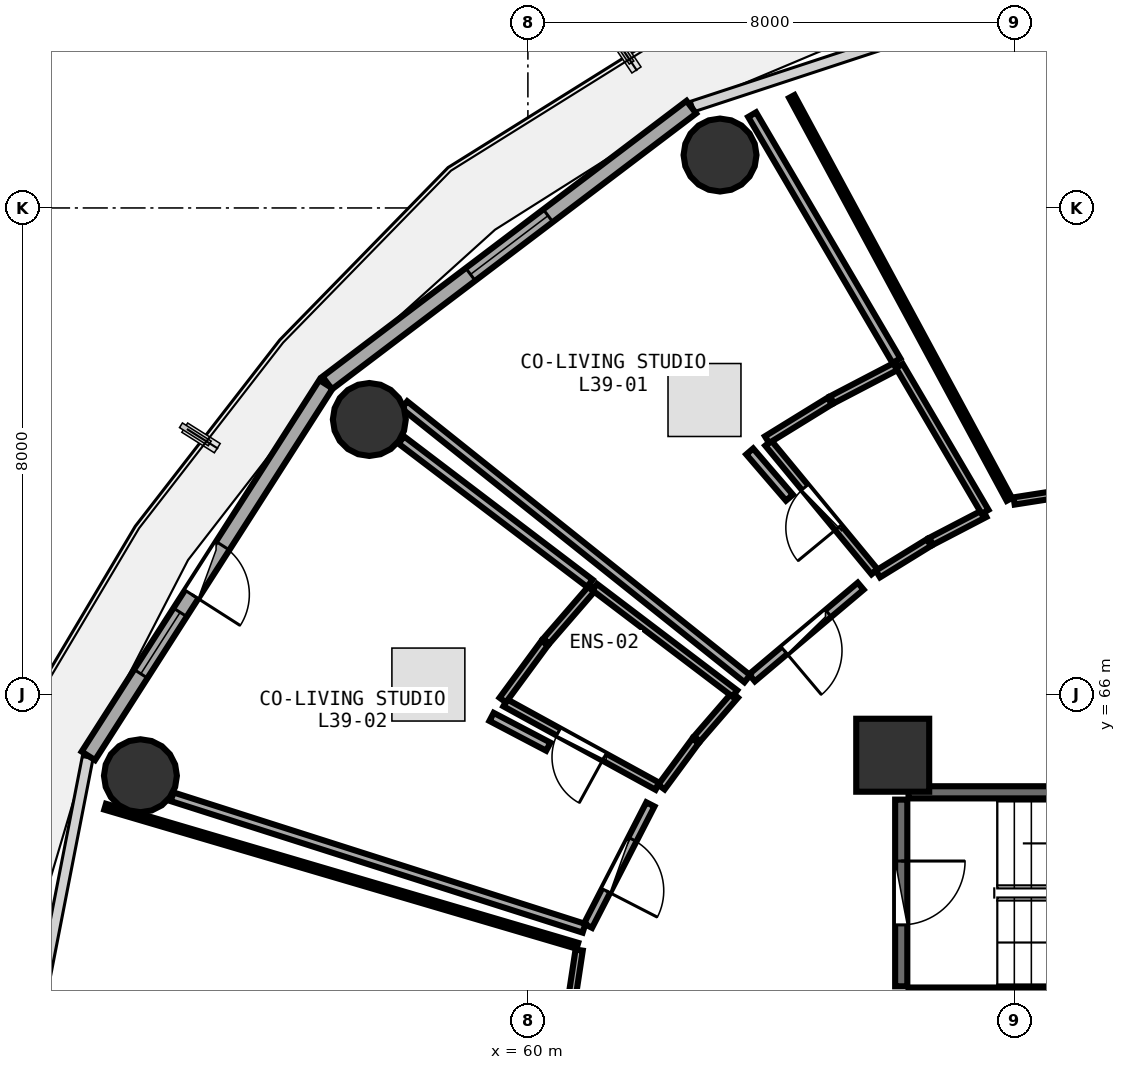
"""IFC4 building model, lengths in metres.
Left out: names, types, materials, properties, quantities, classifications, styles, units other than length and angle.
Written with IfcOpenShell. Run it as: python <this file> out.ifc"""

import sys

from ifc_helpers import new_model, si_unit, direction, frame, frame_2d, origin, origin_2d, place, context, subcontext, project, spatial, rectangle, circle, extrude, element, fill, save


model = new_model("IFC4")
c1 = context("Model", 3, precision=1e-05, world=origin(), true_north=direction((0.0, 1.0)))
c2 = subcontext(c1, "Body", "Model", "MODEL_VIEW")
j1 = project(units=[si_unit("LENGTHUNIT", "METRE"), si_unit("PLANEANGLEUNIT", "RADIAN")], contexts=[c1])
p1 = place(None, origin())
s1 = spatial("IfcSite", under=j1, at=p1, CompositionType="ELEMENT")
p2 = place(p1, origin())
s2 = spatial("IfcBuilding", under=s1, at=p2, CompositionType="ELEMENT")
p3 = place(p2, frame((0.0, 0.0, 154.35)))
s3 = spatial("IfcBuildingStorey", under=s2, at=p3, CompositionType="ELEMENT", Elevation=154.35)
p4 = place(p3, frame((66.0, 65.0, 0.0), z_axis=(0.0, 0.0, 1.0), x_axis=(1.0, 0.0, 0.0)))
e1 = element("IfcColumn", 1, at=p4, inside=s3, PredefinedType="PILASTER", context=c2, shape_type="SweptSolid", body=[
    extrude(rectangle(XDim=1.2, YDim=1.2, at=origin_2d()), origin(), (0.0, 0.0, 1.0), 3.75),
])
for number, where, z_axis, x_axis in (
    (2, (63.16, 74.87, 0.0), (0.0, 0.0, 1.0), (1.0, 0.0, 0.0)),
    (3, (57.392, 70.521, 0.0), (0.0, 0.0, 1.0), (1.0, 0.0, 0.0)),
    (4, (53.627, 64.663, 0.0), (0.0, 0.0, 1.0), (1.0, 0.0, 0.0)),
):
    element("IfcColumn", number, at=place(p3, frame(where, z_axis=z_axis, x_axis=x_axis)), inside=s3, PredefinedType="COLUMN", context=c2, shape_type="SweptSolid", body=[
        extrude(circle(Radius=0.6, at=origin_2d()), origin(), (0.0, 0.0, 1.0), 3.75),
    ])
p5 = place(p3, frame((62.688, 75.658, 0.0), z_axis=(0.0, 0.0, 1.0), x_axis=(-0.797163719609, -0.603763202042, 0.0)))
e5 = element("IfcWall", 5, at=p5, inside=s3, PredefinedType="SOLIDWALL", context=c2, shape_type="SweptSolid", body=[
    extrude(rectangle(XDim=7.512, YDim=0.26, at=frame_2d((3.756, 0.0))), origin(), (0.0, 0.0, 1.0), 3.475),
])
p6 = place(p5, frame((2.956, 0.0, 0.85)))
e6 = element("IfcOpeningElement", 6, at=p6, cuts=e5, PredefinedType="OPENING", context=c2, shape_type="SweptSolid", body=[
    extrude(rectangle(XDim=1.6, YDim=1.45, at=frame_2d((0.8, 0.725))), frame((0.0, 0.14, 0.0), z_axis=(0.0, -1.0, 0.0), x_axis=(1.0, 0.0, 0.0)), (0.0, 0.0, 1.0), 0.28),
])
p7 = place(p3, frame((56.679, 71.1, 0.0), z_axis=(0.0, 0.0, 1.0), x_axis=(-0.538801521808, -0.842432739213, 0.0)))
e7 = element("IfcWall", 7, at=p7, inside=s3, PredefinedType="SOLIDWALL", context=c2, shape_type="SweptSolid", body=[
    extrude(rectangle(XDim=7.253, YDim=0.26, at=frame_2d((3.627, 0.0))), origin(), (0.0, 0.0, 1.0), 3.475),
])
p8 = place(p7, frame((3.152, 0.0, 0.0)))
e8 = element("IfcOpeningElement", 8, at=p8, cuts=e7, PredefinedType="OPENING", context=c2, shape_type="SweptSolid", body=[
    extrude(rectangle(XDim=0.95, YDim=2.1, at=frame_2d((0.475, 1.05))), frame((0.0, 0.14, 0.0), z_axis=(0.0, -1.0, 0.0), x_axis=(1.0, 0.0, 0.0)), (0.0, 0.0, 1.0), 0.28),
])
p9 = place(p7, frame((4.452, 0.0, 0.85)))
e9 = element("IfcOpeningElement", 9, at=p9, cuts=e7, PredefinedType="OPENING", context=c2, shape_type="SweptSolid", body=[
    extrude(rectangle(XDim=1.2, YDim=1.45, at=frame_2d((0.6, 0.725))), frame((0.0, 0.14, 0.0), z_axis=(0.0, -1.0, 0.0), x_axis=(1.0, 0.0, 0.0)), (0.0, 0.0, 1.0), 0.28),
])
for number, where, z_axis, x_axis in (
    (10, (66.26, 61.08, 0.0), (0.0, 0.0, 1.0), (1.0, 0.0, 0.0)),
    (11, (73.42, 64.39, 0.0), (0.0, 0.0, 1.0), (-1.0, 0.0, 0.0)),
):
    element("IfcWall", number, at=place(p3, frame(where, z_axis=z_axis, x_axis=x_axis)), inside=s3, PredefinedType="SHEAR", context=c2, shape_type="SweptSolid", body=[
        extrude(rectangle(XDim=7.16, YDim=0.2, at=frame_2d((3.58, 0.0))), origin(), (0.0, 0.0, 1.0), 3.49),
    ])
p10 = place(p3, frame((66.14, 64.27, 0.0), z_axis=(0.0, 0.0, 1.0), x_axis=(0.0, -1.0, 0.0)))
e12 = element("IfcWall", 12, at=p10, inside=s3, PredefinedType="SHEAR", context=c2, shape_type="SweptSolid", body=[
    extrude(rectangle(XDim=3.07, YDim=0.2, at=frame_2d((1.535, 0.0))), origin(), (0.0, 0.0, 1.0), 3.49),
])
p11 = place(p10, frame((1.01, 0.0, 0.0)))
e13 = element("IfcOpeningElement", 13, at=p11, cuts=e12, PredefinedType="OPENING", context=c2, shape_type="SweptSolid", body=[
    extrude(rectangle(XDim=1.05, YDim=2.1, at=frame_2d((0.525, 1.05))), frame((0.0, 0.11, 0.0), z_axis=(0.0, -1.0, 0.0), x_axis=(1.0, 0.0, 0.0)), (0.0, 0.0, 1.0), 0.22),
])
p12 = place(p3, frame((75.447, 70.347, 0.0), z_axis=(0.0, 0.0, 1.0), x_axis=(-0.987988721118, -0.154526007337, 0.0)))
e14 = element("IfcWall", 14, at=p12, inside=s3, PredefinedType="PARTITIONING", context=c2, shape_type="SweptSolid", body=[
    extrude(rectangle(XDim=7.541, YDim=0.12, at=frame_2d((3.771, 0.0))), origin(), (0.0, 0.0, 1.0), 2.975),
])
p13 = place(p12, frame((3.32, 0.0, 0.0)))
e15 = element("IfcOpeningElement", 15, at=p13, cuts=e14, PredefinedType="OPENING", context=c2, shape_type="SweptSolid", body=[
    extrude(rectangle(XDim=0.9, YDim=2.08, at=frame_2d((0.45, 1.04))), frame((0.0, 0.07, 0.0), z_axis=(0.0, -1.0, 0.0), x_axis=(1.0, 0.0, 0.0)), (0.0, 0.0, 1.0), 0.14),
])
p14 = place(p3, frame((65.702, 68.016, 0.0), z_axis=(0.0, 0.0, 1.0), x_axis=(-0.636757315483, 0.771064278241, 0.0)))
e16 = element("IfcWall", 16, at=p14, inside=s3, PredefinedType="PLUMBINGWALL", context=c2, shape_type="SweptSolid", body=[
    extrude(rectangle(XDim=2.745, YDim=0.13, at=frame_2d((1.373, 0.0))), origin(), (0.0, 0.0, 1.0), 2.975),
])
p15 = place(p14, frame((0.942, 0.0, 0.0)))
e17 = element("IfcOpeningElement", 17, at=p15, cuts=e16, PredefinedType="OPENING", context=c2, shape_type="SweptSolid", body=[
    extrude(rectangle(XDim=0.86, YDim=2.05, at=frame_2d((0.43, 1.025))), frame((0.0, 0.075, 0.0), z_axis=(0.0, -1.0, 0.0), x_axis=(1.0, 0.0, 0.0)), (0.0, 0.0, 1.0), 0.15),
])
p16 = place(p3, frame((65.473, 67.78, 0.0), z_axis=(0.0, 0.0, 1.0), x_axis=(-0.764572750514, -0.644537438146, 0.0)))
e18 = element("IfcWall", 18, at=p16, inside=s3, PredefinedType="PARTITIONING", context=c2, shape_type="SweptSolid", body=[
    extrude(rectangle(XDim=2.339, YDim=0.15, at=frame_2d((1.169, 0.0))), origin(), (0.0, 0.0, 1.0), 2.975),
])
p17 = place(p16, frame((0.694, 0.0, 0.0)))
e19 = element("IfcOpeningElement", 19, at=p17, cuts=e18, PredefinedType="OPENING", context=c2, shape_type="SweptSolid", body=[
    extrude(rectangle(XDim=0.95, YDim=2.08, at=frame_2d((0.475, 1.04))), frame((0.0, 0.085, 0.0), z_axis=(0.0, -1.0, 0.0), x_axis=(1.0, 0.0, 0.0)), (0.0, 0.0, 1.0), 0.17),
])
p18 = place(p3, frame((62.131, 64.489, 0.0), z_axis=(0.0, 0.0, 1.0), x_axis=(-0.87680194327, 0.480851694681, 0.0)))
e20 = element("IfcWall", 20, at=p18, inside=s3, PredefinedType="PLUMBINGWALL", context=c2, shape_type="SweptSolid", body=[
    extrude(rectangle(XDim=2.855, YDim=0.13, at=frame_2d((1.428, 0.0))), origin(), (0.0, 0.0, 1.0), 2.975),
])
p19 = place(p18, frame((0.998, 0.0, 0.0)))
e21 = element("IfcOpeningElement", 21, at=p19, cuts=e20, PredefinedType="OPENING", context=c2, shape_type="SweptSolid", body=[
    extrude(rectangle(XDim=0.86, YDim=2.05, at=frame_2d((0.43, 1.025))), frame((0.0, 0.075, 0.0), z_axis=(0.0, -1.0, 0.0), x_axis=(1.0, 0.0, 0.0)), (0.0, 0.0, 1.0), 0.15),
])
p20 = place(p3, frame((62.015, 64.192, 0.0), z_axis=(0.0, 0.0, 1.0), x_axis=(-0.457234963971, -0.889345932538, 0.0)))
e22 = element("IfcWall", 22, at=p20, inside=s3, PredefinedType="PARTITIONING", context=c2, shape_type="SweptSolid", body=[
    extrude(rectangle(XDim=2.245, YDim=0.15, at=frame_2d((1.122, 0.0))), origin(), (0.0, 0.0, 1.0), 3.235),
])
p21 = place(p20, frame((0.647, 0.0, 0.0)))
e23 = element("IfcOpeningElement", 23, at=p21, cuts=e22, PredefinedType="OPENING", context=c2, shape_type="SweptSolid", body=[
    extrude(rectangle(XDim=0.95, YDim=2.08, at=frame_2d((0.475, 1.04))), frame((0.0, 0.085, 0.0), z_axis=(0.0, -1.0, 0.0), x_axis=(1.0, 0.0, 0.0)), (0.0, 0.0, 1.0), 0.17),
])
p22 = place(p3, frame((60.843, 61.796, 0.0), z_axis=(0.0, 0.0, 1.0), x_axis=(-0.149807046494, -0.988715251638, 0.0)))
e24 = element("IfcWall", 24, at=p22, inside=s3, PredefinedType="PARTITIONING", context=c2, shape_type="SweptSolid", body=[
    extrude(rectangle(XDim=4.338, YDim=0.12, at=frame_2d((2.169, 0.0))), origin(), (0.0, 0.0, 1.0), 2.975),
])
p23 = place(p22, frame((1.719, 0.0, 0.0)))
e25 = element("IfcOpeningElement", 25, at=p23, cuts=e24, PredefinedType="OPENING", context=c2, shape_type="SweptSolid", body=[
    extrude(rectangle(XDim=0.9, YDim=2.08, at=frame_2d((0.45, 1.04))), frame((0.0, 0.07, 0.0), z_axis=(0.0, -1.0, 0.0), x_axis=(1.0, 0.0, 0.0)), (0.0, 0.0, 1.0), 0.14),
])
p24 = place(p3, frame((67.918, 69.207, 0.0), z_axis=(0.0, 0.0, 1.0), x_axis=(-0.475160964166, 0.879898890858, 0.0)))
e26 = element("IfcWall", 26, at=p24, inside=s3, PredefinedType="PARTITIONING", context=c2, shape_type="SweptSolid", body=[
    extrude(rectangle(XDim=7.53, YDim=0.1, at=frame_2d((3.765, 0.0))), origin(), (0.0, 0.0, 1.0), 3.025),
])
p25 = place(p3, frame((67.511, 68.976, 0.0), z_axis=(0.0, 0.0, 1.0), x_axis=(-0.88687840459, -0.462002917168, 0.0)))
e27 = element("IfcWall", 27, at=p25, inside=s3, PredefinedType="PLUMBINGWALL", context=c2, shape_type="SweptSolid", body=[
    extrude(rectangle(XDim=0.993, YDim=0.13, at=frame_2d((0.497, 0.0))), origin(), (0.0, 0.0, 1.0), 3.235),
])
p26 = place(p3, frame((66.596, 68.498, 0.0), z_axis=(0.0, 0.0, 1.0), x_axis=(-0.851266784219, -0.52473313416, 0.0)))
e28 = element("IfcWall", 28, at=p26, inside=s3, PredefinedType="PLUMBINGWALL", context=c2, shape_type="SweptSolid", body=[
    extrude(rectangle(XDim=0.985, YDim=0.13, at=frame_2d((0.493, 0.0))), origin(), (0.0, 0.0, 1.0), 3.48),
])
p27 = place(p3, frame((63.933, 70.189, 0.0), z_axis=(0.0, 0.0, 1.0), x_axis=(0.851319302067, 0.524647925688, 0.0)))
e29 = element("IfcWall", 29, at=p27, inside=s3, PredefinedType="PLUMBINGWALL", context=c2, shape_type="SweptSolid", body=[
    extrude(rectangle(XDim=1.212, YDim=0.13, at=frame_2d((0.606, 0.0))), origin(), (0.0, 0.0, 1.0), 2.975),
])
p28 = place(p3, frame((65.0, 70.845, 0.0), z_axis=(0.0, 0.0, 1.0), x_axis=(0.886527747476, 0.462675429383, 0.0)))
e30 = element("IfcWall", 30, at=p28, inside=s3, PredefinedType="PLUMBINGWALL", context=c2, shape_type="SweptSolid", body=[
    extrude(rectangle(XDim=1.22, YDim=0.13, at=frame_2d((0.61, 0.0))), origin(), (0.0, 0.0, 1.0), 3.175),
])
p29 = place(p3, frame((66.109, 71.402, 0.0), z_axis=(0.0, 0.0, 1.0), x_axis=(0.506513995599, -0.862231739304, 0.0)))
e31 = element("IfcWall", 31, at=p29, inside=s3, PredefinedType="PLUMBINGWALL", context=c2, shape_type="SweptSolid", body=[
    extrude(rectangle(XDim=2.783, YDim=0.13, at=frame_2d((1.392, 0.0))), origin(), (0.0, 0.0, 1.0), 3.175),
])
p30 = place(p3, frame((63.608, 66.259, 0.0), z_axis=(0.0, 0.0, 1.0), x_axis=(-0.781429667655, 0.623993328898, 0.0)))
e32 = element("IfcWall", 32, at=p30, inside=s3, PredefinedType="PARTITIONING", context=c2, shape_type="SweptSolid", body=[
    extrude(rectangle(XDim=7.216, YDim=0.15, at=frame_2d((3.608, 0.0))), origin(), (0.0, 0.0, 1.0), 2.975),
])
p31 = place(p3, frame((63.688, 75.534, 0.0), z_axis=(0.0, 0.0, 1.0), x_axis=(0.505850409321, -0.862621216636, 0.0)))
e33 = element("IfcWall", 33, at=p31, inside=s3, PredefinedType="PARTITIONING", context=c2, shape_type="SweptSolid", body=[
    extrude(rectangle(XDim=4.69, YDim=0.15, at=frame_2d((2.345, 0.0))), origin(), (0.0, 0.0, 1.0), 3.025),
])
p32 = place(p3, frame((63.648, 69.996, 0.0), z_axis=(0.0, 0.0, 1.0), x_axis=(0.651733897109, -0.758447709047, 0.0)))
e34 = element("IfcWall", 34, at=p32, inside=s3, PredefinedType="PARTITIONING", context=c2, shape_type="SweptSolid", body=[
    extrude(rectangle(XDim=1.002, YDim=0.15, at=frame_2d((0.501, 0.0))), origin(), (0.0, 0.0, 1.0), 3.48),
])
p33 = place(p3, frame((63.406, 65.989, 0.0), z_axis=(0.0, 0.0, 1.0), x_axis=(-0.654452758924, -0.756102894015, 0.0)))
e35 = element("IfcWall", 35, at=p33, inside=s3, PredefinedType="PLUMBINGWALL", context=c2, shape_type="SweptSolid", body=[
    extrude(rectangle(XDim=0.954, YDim=0.13, at=frame_2d((0.477, 0.0))), origin(), (0.0, 0.0, 1.0), 3.48),
])
p34 = place(p3, frame((62.757, 65.237, 0.0), z_axis=(0.0, 0.0, 1.0), x_axis=(-0.593701036402, -0.804685702231, 0.0)))
e36 = element("IfcWall", 36, at=p34, inside=s3, PredefinedType="PLUMBINGWALL", context=c2, shape_type="SweptSolid", body=[
    extrude(rectangle(XDim=0.945, YDim=0.13, at=frame_2d((0.473, 0.0))), origin(), (0.0, 0.0, 1.0), 2.975),
])
p35 = place(p3, frame((59.587, 65.907, 0.0), z_axis=(0.0, 0.0, 1.0), x_axis=(0.592518663081, 0.805556722956, 0.0)))
e37 = element("IfcWall", 37, at=p35, inside=s3, PredefinedType="PLUMBINGWALL", context=c2, shape_type="SweptSolid", body=[
    extrude(rectangle(XDim=1.163, YDim=0.13, at=frame_2d((0.582, 0.0))), origin(), (0.0, 0.0, 1.0), 3.48),
])
p36 = place(p3, frame((60.301, 66.875, 0.0), z_axis=(0.0, 0.0, 1.0), x_axis=(0.654502595292, 0.756059754752, 0.0)))
e38 = element("IfcWall", 38, at=p36, inside=s3, PredefinedType="PLUMBINGWALL", context=c2, shape_type="SweptSolid", body=[
    extrude(rectangle(XDim=1.173, YDim=0.13, at=frame_2d((0.586, 0.0))), origin(), (0.0, 0.0, 1.0), 3.48),
])
p37 = place(p3, frame((61.098, 67.765, 0.0), z_axis=(0.0, 0.0, 1.0), x_axis=(0.796687067956, -0.604392021581, 0.0)))
e39 = element("IfcWall", 39, at=p37, inside=s3, PredefinedType="PLUMBINGWALL", context=c2, shape_type="SweptSolid", body=[
    extrude(rectangle(XDim=2.894, YDim=0.13, at=frame_2d((1.447, 0.0))), origin(), (0.0, 0.0, 1.0), 3.235),
])
p38 = place(p3, frame((60.923, 62.154, 0.0), z_axis=(0.0, 0.0, 1.0), x_axis=(-0.952653075659, 0.304059397878, 0.0)))
e40 = element("IfcWall", 40, at=p38, inside=s3, PredefinedType="PARTITIONING", context=c2, shape_type="SweptSolid", body=[
    extrude(rectangle(XDim=7.112, YDim=0.15, at=frame_2d((3.556, 0.0))), origin(), (0.0, 0.0, 1.0), 3.175),
])
p39 = place(p3, frame((57.918, 70.184, 0.0), z_axis=(0.0, 0.0, 1.0), x_axis=(0.796177895966, -0.605062606657, 0.0)))
e41 = element("IfcWall", 41, at=p39, inside=s3, PredefinedType="PARTITIONING", context=c2, shape_type="SweptSolid", body=[
    extrude(rectangle(XDim=3.895, YDim=0.15, at=frame_2d((1.948, 0.0))), origin(), (0.0, 0.0, 1.0), 2.975),
])
p40 = place(p3, frame((59.402, 65.63, 0.0), z_axis=(0.0, 0.0, 1.0), x_axis=(0.885450338388, -0.46473400806, 0.0)))
e42 = element("IfcWall", 42, at=p40, inside=s3, PredefinedType="PARTITIONING", context=c2, shape_type="SweptSolid", body=[
    extrude(rectangle(XDim=1.054, YDim=0.15, at=frame_2d((0.527, 0.0))), origin(), (0.0, 0.0, 1.0), 3.48),
])
p41 = place(p3, frame((53.047, 64.154, 0.0), z_axis=(0.0, 0.0, 1.0), x_axis=(0.959252584651, -0.282549958133, 0.0)))
e43 = element("IfcWall", 43, at=p41, inside=s3, PredefinedType="PARTITIONING", context=c2, shape_type="SweptSolid", body=[
    extrude(rectangle(XDim=8.096, YDim=0.1, at=frame_2d((4.048, 0.0))), origin(), (0.0, 0.0, 1.0), 3.025),
])
p42 = place(p6, origin())
e44 = element("IfcWindow", 44, at=p42, inside=s3, PartitioningType="SINGLE_PANEL", PredefinedType="WINDOW", context=c2, shape_type="SweptSolid", body=[
    extrude(rectangle(XDim=1.6, YDim=1.45, at=frame_2d((0.8, 0.725))), frame((0.0, 0.03, 0.0), z_axis=(0.0, -1.0, 0.0), x_axis=(1.0, 0.0, 0.0)), (0.0, 0.0, 1.0), 0.06),
])
fill(e6, e44)
p43 = place(p8, frame((0.95, 0.0, 0.0), z_axis=(0.0, 0.0, 1.0), x_axis=(-1.0, 0.0, 0.0)))
e45 = element("IfcDoor", 45, at=p43, inside=s3, OperationType="SINGLE_SWING_LEFT", PredefinedType="DOOR", context=c2, shape_type="SweptSolid", body=[
    extrude(rectangle(XDim=0.95, YDim=2.1, at=frame_2d((0.475, 1.05))), frame((0.0, 0.025, 0.0), z_axis=(0.0, -1.0, 0.0), x_axis=(1.0, 0.0, 0.0)), (0.0, 0.0, 1.0), 0.05),
])
fill(e8, e45)
p44 = place(p9, origin())
e46 = element("IfcWindow", 46, at=p44, inside=s3, PartitioningType="SINGLE_PANEL", PredefinedType="WINDOW", context=c2, shape_type="SweptSolid", body=[
    extrude(rectangle(XDim=1.2, YDim=1.45, at=frame_2d((0.6, 0.725))), frame((0.0, 0.03, 0.0), z_axis=(0.0, -1.0, 0.0), x_axis=(1.0, 0.0, 0.0)), (0.0, 0.0, 1.0), 0.06),
])
fill(e9, e46)
p45 = place(p11, origin())
e47 = element("IfcDoor", 47, at=p45, inside=s3, OperationType="SINGLE_SWING_LEFT", PredefinedType="DOOR", context=c2, shape_type="SweptSolid", body=[
    extrude(rectangle(XDim=1.05, YDim=2.1, at=frame_2d((0.525, 1.05))), frame((0.0, 0.025, 0.0), z_axis=(0.0, -1.0, 0.0), x_axis=(1.0, 0.0, 0.0)), (0.0, 0.0, 1.0), 0.05),
])
fill(e13, e47)
p46 = place(p15, origin())
e48 = element("IfcDoor", 48, at=p46, inside=s3, OperationType="SINGLE_SWING_LEFT", PredefinedType="DOOR", context=c2, shape_type="SweptSolid", body=[
    extrude(rectangle(XDim=0.86, YDim=2.05, at=frame_2d((0.43, 1.025))), frame((0.0, 0.025, 0.0), z_axis=(0.0, -1.0, 0.0), x_axis=(1.0, 0.0, 0.0)), (0.0, 0.0, 1.0), 0.05),
])
fill(e17, e48)
p47 = place(p17, origin())
e49 = element("IfcDoor", 49, at=p47, inside=s3, OperationType="SINGLE_SWING_RIGHT", PredefinedType="DOOR", context=c2, shape_type="SweptSolid", body=[
    extrude(rectangle(XDim=0.95, YDim=2.08, at=frame_2d((0.475, 1.04))), frame((0.0, 0.025, 0.0), z_axis=(0.0, -1.0, 0.0), x_axis=(1.0, 0.0, 0.0)), (0.0, 0.0, 1.0), 0.05),
])
fill(e19, e49)
p48 = place(p19, origin())
e50 = element("IfcDoor", 50, at=p48, inside=s3, OperationType="SINGLE_SWING_LEFT", PredefinedType="DOOR", context=c2, shape_type="SweptSolid", body=[
    extrude(rectangle(XDim=0.86, YDim=2.05, at=frame_2d((0.43, 1.025))), frame((0.0, 0.025, 0.0), z_axis=(0.0, -1.0, 0.0), x_axis=(1.0, 0.0, 0.0)), (0.0, 0.0, 1.0), 0.05),
])
fill(e21, e50)
p49 = place(p21, origin())
e51 = element("IfcDoor", 51, at=p49, inside=s3, OperationType="SINGLE_SWING_RIGHT", PredefinedType="DOOR", context=c2, shape_type="SweptSolid", body=[
    extrude(rectangle(XDim=0.95, YDim=2.08, at=frame_2d((0.475, 1.04))), frame((0.0, 0.025, 0.0), z_axis=(0.0, -1.0, 0.0), x_axis=(1.0, 0.0, 0.0)), (0.0, 0.0, 1.0), 0.05),
])
fill(e23, e51)
save(model, sys.argv[1])
